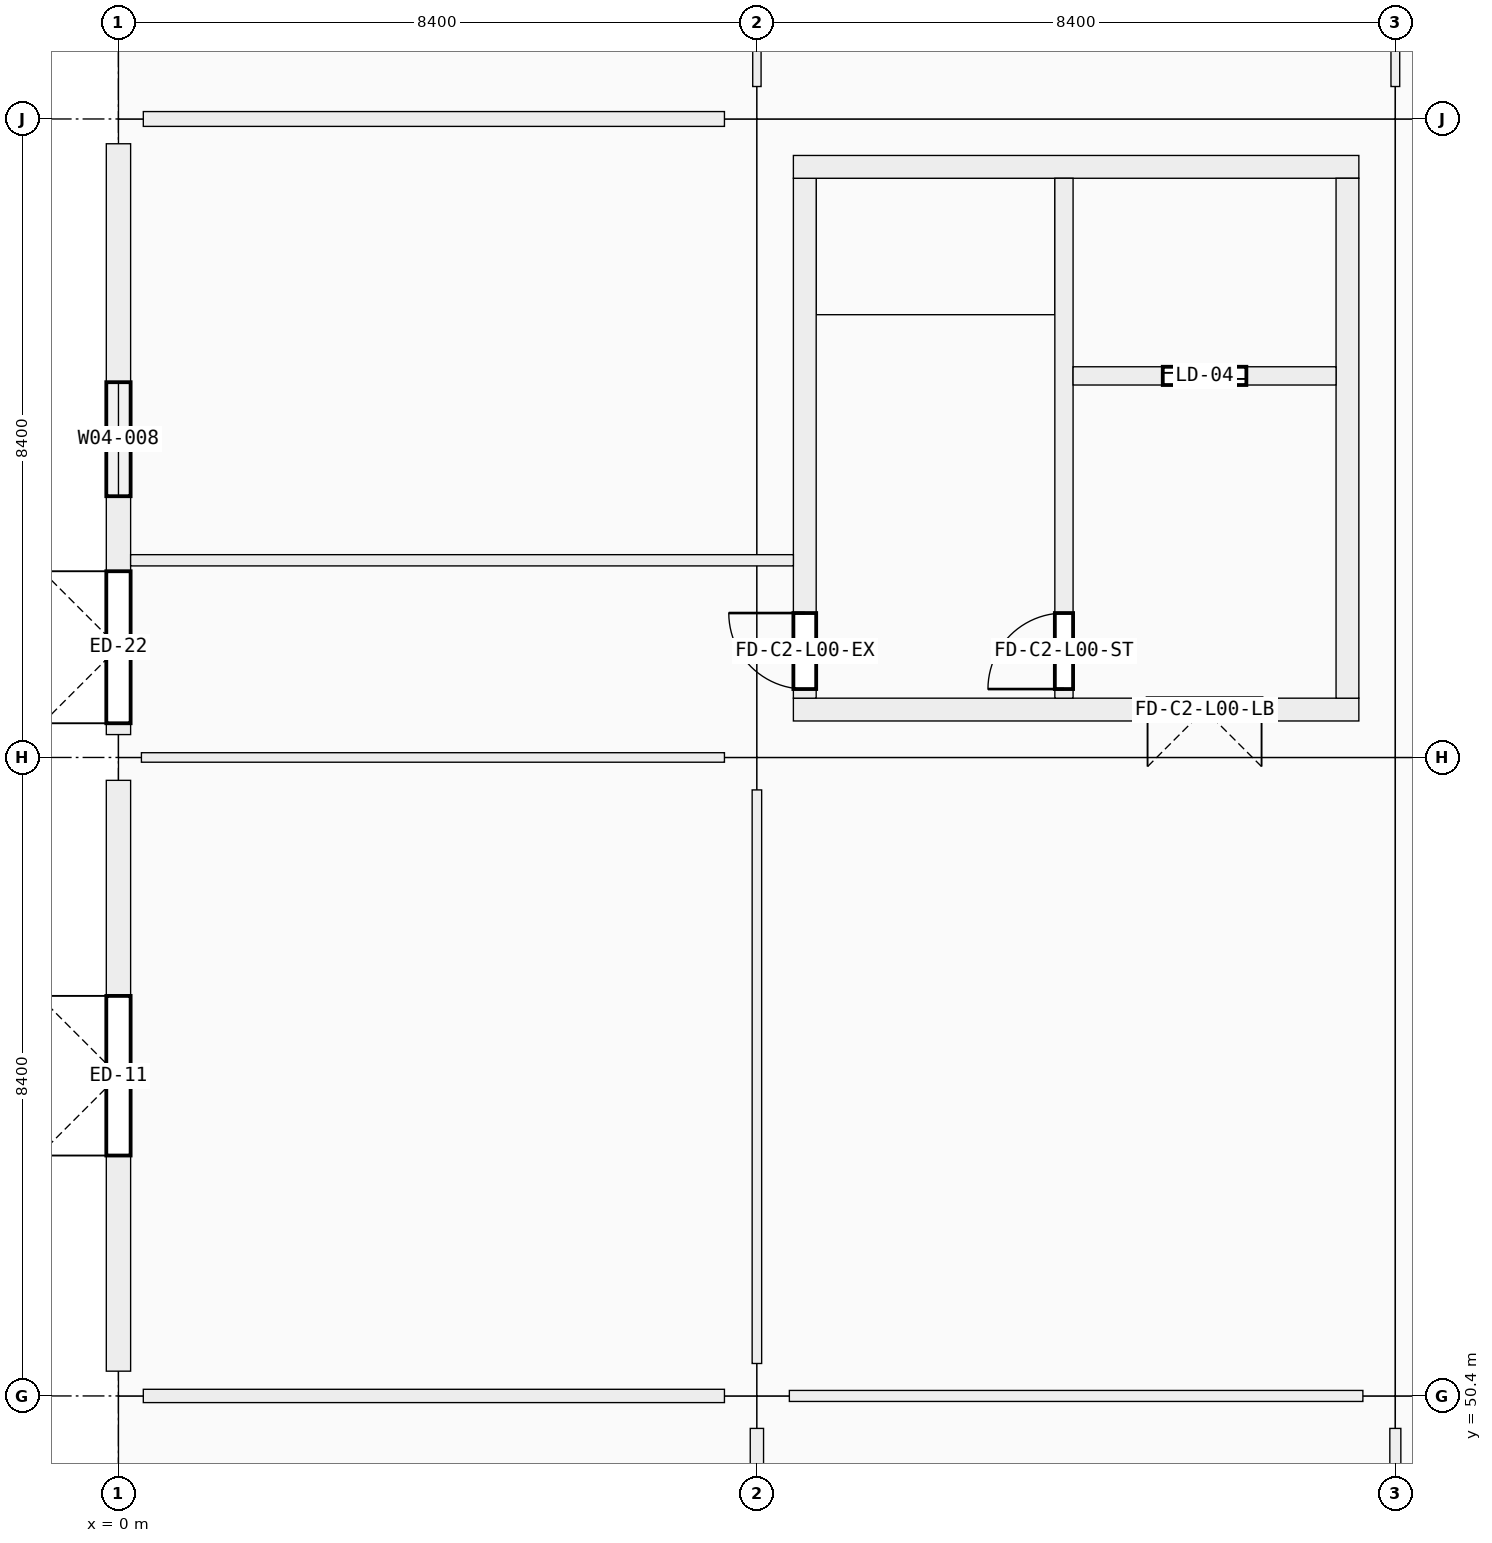
"""IFC4 building model, lengths in metres.
Left out: names, types, materials, properties, quantities, classifications, styles, units other than length and angle.
Written with IfcOpenShell. Run it as: python <this file> out.ifc"""

import sys

from ifc_helpers import new_model, si_unit, direction, frame, frame_2d, origin, origin_2d, place, context, subcontext, project, spatial, rectangle, extrude, element, fill, save


model = new_model("IFC4")
c1 = context("Model", 3, precision=1e-05, world=origin(), true_north=direction((0.0, 1.0)))
c2 = subcontext(c1, "Body", "Model", "MODEL_VIEW")
j1 = project(units=[si_unit("LENGTHUNIT", "METRE"), si_unit("PLANEANGLEUNIT", "RADIAN")], contexts=[c1])
p1 = place(None, origin())
s1 = spatial("IfcSite", under=j1, at=p1, CompositionType="ELEMENT")
p2 = place(p1, origin())
s2 = spatial("IfcBuilding", under=s1, at=p2, CompositionType="ELEMENT")
p3 = place(p2, origin())
s3 = spatial("IfcBuildingStorey", under=s2, at=p3, CompositionType="ELEMENT", Elevation=0.0)
p4 = place(p3, frame((0.0, 50.4, 0.0), z_axis=(0.0, 0.0, 1.0), x_axis=(1.0, 0.0, 0.0)))
e1 = element("IfcColumn", 1, at=p4, inside=s3, PredefinedType="COLUMN", context=c2, shape_type="SweptSolid", body=[
    extrude(rectangle(XDim=0.65, YDim=0.65, at=origin_2d()), origin(), (0.0, 0.0, 1.0), 5.76),
])
p5 = place(p3, frame((0.0, 58.8, 0.0), z_axis=(0.0, 0.0, 1.0), x_axis=(1.0, 0.0, 0.0)))
e2 = element("IfcColumn", 2, at=p5, inside=s3, PredefinedType="COLUMN", context=c2, shape_type="SweptSolid", body=[
    extrude(rectangle(XDim=0.6, YDim=0.6, at=origin_2d()), origin(), (0.0, 0.0, 1.0), 5.76),
])
p6 = place(p3, frame((0.0, 67.2, 0.0), z_axis=(0.0, 0.0, 1.0), x_axis=(1.0, 0.0, 0.0)))
e3 = element("IfcColumn", 3, at=p6, inside=s3, PredefinedType="COLUMN", context=c2, shape_type="SweptSolid", body=[
    extrude(rectangle(XDim=0.65, YDim=0.65, at=origin_2d()), origin(), (0.0, 0.0, 1.0), 5.76),
])
for number, where, z_axis, x_axis in (
    (4, (8.4, 50.4, 0.0), (0.0, 0.0, 1.0), (1.0, 0.0, 0.0)),
    (5, (8.4, 58.8, 0.0), (0.0, 0.0, 1.0), (1.0, 0.0, 0.0)),
    (6, (8.4, 67.2, 0.0), (0.0, 0.0, 1.0), (1.0, 0.0, 0.0)),
    (7, (16.8, 50.4, 0.0), (0.0, 0.0, 1.0), (1.0, 0.0, 0.0)),
    (8, (16.8, 58.8, 0.0), (0.0, 0.0, 1.0), (1.0, 0.0, 0.0)),
    (9, (16.8, 67.2, 0.0), (0.0, 0.0, 1.0), (1.0, 0.0, 0.0)),
):
    element("IfcColumn", number, at=place(p3, frame(where, z_axis=z_axis, x_axis=x_axis)), inside=s3, PredefinedType="COLUMN", context=c2, shape_type="SweptSolid", body=[
        extrude(rectangle(XDim=0.85, YDim=0.85, at=origin_2d()), origin(), (0.0, 0.0, 1.0), 5.76),
    ])
p7 = place(p3, frame((0.0, 50.726, 0.0), z_axis=(0.0, 0.0, 1.0), x_axis=(0.0, 1.0, 0.0)))
e10 = element("IfcWall", 10, at=p7, inside=s3, PredefinedType="SOLIDWALL", context=c2, shape_type="SweptSolid", body=[
    extrude(rectangle(XDim=7.773, YDim=0.32, at=frame_2d((3.886, 0.0))), origin(), (0.0, 0.0, 1.0), 4.7),
])
p8 = place(p7, frame((2.837, 0.0, 0.0)))
e11 = element("IfcOpeningElement", 11, at=p8, cuts=e10, PredefinedType="OPENING", context=c2, shape_type="SweptSolid", body=[
    extrude(rectangle(XDim=2.1, YDim=2.25, at=frame_2d((1.05, 1.125))), frame((0.0, 0.16, 0.0), z_axis=(0.0, -1.0, 0.0), x_axis=(1.0, 0.0, 0.0)), (0.0, 0.0, 1.0), 0.32),
])
p9 = place(p3, frame((0.0, 59.101, 0.0), z_axis=(0.0, 0.0, 1.0), x_axis=(0.0, 1.0, 0.0)))
e12 = element("IfcWall", 12, at=p9, inside=s3, PredefinedType="SOLIDWALL", context=c2, shape_type="SweptSolid", body=[
    extrude(rectangle(XDim=7.773, YDim=0.32, at=frame_2d((3.886, 0.0))), origin(), (0.0, 0.0, 1.0), 4.7),
])
p10 = place(p9, frame((3.136, 0.0, 0.9)))
e13 = element("IfcOpeningElement", 13, at=p10, cuts=e12, PredefinedType="OPENING", context=c2, shape_type="SweptSolid", body=[
    extrude(rectangle(XDim=1.5, YDim=1.8, at=frame_2d((0.75, 0.9))), frame((0.0, 0.16, 0.0), z_axis=(0.0, -1.0, 0.0), x_axis=(1.0, 0.0, 0.0)), (0.0, 0.0, 1.0), 0.32),
])
p11 = place(p9, frame((0.149, 0.0, 0.0)))
e14 = element("IfcOpeningElement", 14, at=p11, cuts=e12, PredefinedType="OPENING", context=c2, shape_type="SweptSolid", body=[
    extrude(rectangle(XDim=2.0, YDim=2.25, at=frame_2d((1.0, 1.125))), frame((0.0, 0.16, 0.0), z_axis=(0.0, -1.0, 0.0), x_axis=(1.0, 0.0, 0.0)), (0.0, 0.0, 1.0), 0.32),
])
p12 = place(p3, frame((16.32, 59.43, 0.0), z_axis=(0.0, 0.0, 1.0), x_axis=(-1.0, 0.0, 0.0)))
e15 = element("IfcWall", 15, at=p12, inside=s3, PredefinedType="SHEAR", context=c2, shape_type="SweptSolid", body=[
    extrude(rectangle(XDim=7.44, YDim=0.3, at=frame_2d((3.72, 0.0))), origin(), (0.0, 0.0, 1.0), 5.76),
])
p13 = place(p12, frame((1.28, 0.0, 0.0)))
e16 = element("IfcOpeningElement", 16, at=p13, cuts=e15, PredefinedType="OPENING", context=c2, shape_type="SweptSolid", body=[
    extrude(rectangle(XDim=1.5, YDim=2.15, at=frame_2d((0.75, 1.075))), frame((0.0, 0.15, 0.0), z_axis=(0.0, -1.0, 0.0), x_axis=(1.0, 0.0, 0.0)), (0.0, 0.0, 1.0), 0.3),
])
p14 = place(p3, frame((9.03, 59.58, 0.0), z_axis=(0.0, 0.0, 1.0), x_axis=(0.0, 1.0, 0.0)))
e17 = element("IfcWall", 17, at=p14, inside=s3, PredefinedType="SHEAR", context=c2, shape_type="SweptSolid", body=[
    extrude(rectangle(XDim=6.84, YDim=0.3, at=frame_2d((3.42, 0.0))), origin(), (0.0, 0.0, 1.0), 5.76),
])
p15 = place(p14, frame((0.12, 0.0, 0.0)))
e18 = element("IfcOpeningElement", 18, at=p15, cuts=e17, PredefinedType="OPENING", context=c2, shape_type="SweptSolid", body=[
    extrude(rectangle(XDim=1.0, YDim=2.15, at=frame_2d((0.5, 1.075))), frame((0.0, 0.15, 0.0), z_axis=(0.0, -1.0, 0.0), x_axis=(1.0, 0.0, 0.0)), (0.0, 0.0, 1.0), 0.3),
])
p16 = place(p3, frame((8.88, 66.57, 0.0), z_axis=(0.0, 0.0, 1.0), x_axis=(1.0, 0.0, 0.0)))
e19 = element("IfcWall", 19, at=p16, inside=s3, PredefinedType="SHEAR", context=c2, shape_type="SweptSolid", body=[
    extrude(rectangle(XDim=7.44, YDim=0.3, at=frame_2d((3.72, 0.0))), origin(), (0.0, 0.0, 1.0), 5.76),
])
p17 = place(p3, frame((16.17, 66.42, 0.0), z_axis=(0.0, 0.0, 1.0), x_axis=(0.0, -1.0, 0.0)))
e20 = element("IfcWall", 20, at=p17, inside=s3, PredefinedType="SHEAR", context=c2, shape_type="SweptSolid", body=[
    extrude(rectangle(XDim=6.84, YDim=0.3, at=frame_2d((3.42, 0.0))), origin(), (0.0, 0.0, 1.0), 5.76),
])
p18 = place(p3, frame((12.44, 59.58, 0.0), z_axis=(0.0, 0.0, 1.0), x_axis=(0.0, 1.0, 0.0)))
e21 = element("IfcWall", 21, at=p18, inside=s3, PredefinedType="SHEAR", context=c2, shape_type="SweptSolid", body=[
    extrude(rectangle(XDim=6.84, YDim=0.24, at=frame_2d((3.42, 0.0))), origin(), (0.0, 0.0, 1.0), 5.76),
])
p19 = place(p18, frame((0.12, 0.0, 0.0)))
e22 = element("IfcOpeningElement", 22, at=p19, cuts=e21, PredefinedType="OPENING", context=c2, shape_type="SweptSolid", body=[
    extrude(rectangle(XDim=1.0, YDim=2.15, at=frame_2d((0.5, 1.075))), frame((0.0, 0.12, 0.0), z_axis=(0.0, -1.0, 0.0), x_axis=(1.0, 0.0, 0.0)), (0.0, 0.0, 1.0), 0.24),
])
p20 = place(p3, frame((12.56, 63.82, 0.0), z_axis=(0.0, 0.0, 1.0), x_axis=(1.0, 0.0, 0.0)))
e23 = element("IfcWall", 23, at=p20, inside=s3, PredefinedType="SHEAR", context=c2, shape_type="SweptSolid", body=[
    extrude(rectangle(XDim=3.46, YDim=0.24, at=frame_2d((1.73, 0.0))), origin(), (0.0, 0.0, 1.0), 5.76),
])
p21 = place(p20, frame((1.18, 0.0, 0.0)))
e24 = element("IfcOpeningElement", 24, at=p21, cuts=e23, PredefinedType="OPENING", context=c2, shape_type="SweptSolid", body=[
    extrude(rectangle(XDim=1.1, YDim=2.15, at=frame_2d((0.55, 1.075))), frame((0.0, 0.12, 0.0), z_axis=(0.0, -1.0, 0.0), x_axis=(1.0, 0.0, 0.0)), (0.0, 0.0, 1.0), 0.24),
])
p22 = place(p3, frame((0.327, 50.4, 0.0), z_axis=(0.0, 0.0, 1.0), x_axis=(1.0, 0.0, 0.0)))
e25 = element("IfcWall", 25, at=p22, inside=s3, PredefinedType="PARTITIONING", context=c2, shape_type="SweptSolid", body=[
    extrude(rectangle(XDim=7.646, YDim=0.175, at=frame_2d((3.823, 0.0))), origin(), (0.0, 0.0, 1.0), 3.66),
])
p23 = place(p22, frame((3.318, 0.0, 0.0)))
e26 = element("IfcOpeningElement", 26, at=p23, cuts=e25, PredefinedType="OPENING", context=c2, shape_type="SweptSolid", body=[
    extrude(rectangle(XDim=1.01, YDim=2.12, at=frame_2d((0.505, 1.06))), frame((0.0, 0.087, 0.0), z_axis=(0.0, -1.0, 0.0), x_axis=(1.0, 0.0, 0.0)), (0.0, 0.0, 1.0), 0.175),
])
p24 = place(p3, frame((0.302, 58.8, 0.0), z_axis=(0.0, 0.0, 1.0), x_axis=(1.0, 0.0, 0.0)))
e27 = element("IfcWall", 27, at=p24, inside=s3, PredefinedType="PARTITIONING", context=c2, shape_type="SweptSolid", body=[
    extrude(rectangle(XDim=7.671, YDim=0.125, at=frame_2d((3.835, 0.0))), origin(), (0.0, 0.0, 1.0), 3.66),
])
p25 = place(p24, frame((3.316, 0.0, 0.0)))
e28 = element("IfcOpeningElement", 28, at=p25, cuts=e27, PredefinedType="OPENING", context=c2, shape_type="SweptSolid", body=[
    extrude(rectangle(XDim=1.04, YDim=2.2, at=frame_2d((0.52, 1.1))), frame((0.0, 0.062, 0.0), z_axis=(0.0, -1.0, 0.0), x_axis=(1.0, 0.0, 0.0)), (0.0, 0.0, 1.0), 0.125),
])
p26 = place(p3, frame((0.327, 67.2, 0.0), z_axis=(0.0, 0.0, 1.0), x_axis=(1.0, 0.0, 0.0)))
e29 = element("IfcWall", 29, at=p26, inside=s3, PredefinedType="PARTITIONING", context=c2, shape_type="SweptSolid", body=[
    extrude(rectangle(XDim=7.646, YDim=0.195, at=frame_2d((3.823, 0.0))), origin(), (0.0, 0.0, 1.0), 3.66),
])
p27 = place(p26, frame((3.313, 0.0, 0.0)))
e30 = element("IfcOpeningElement", 30, at=p27, cuts=e29, PredefinedType="OPENING", context=c2, shape_type="SweptSolid", body=[
    extrude(rectangle(XDim=1.02, YDim=2.2, at=frame_2d((0.51, 1.1))), frame((0.0, 0.098, 0.0), z_axis=(0.0, -1.0, 0.0), x_axis=(1.0, 0.0, 0.0)), (0.0, 0.0, 1.0), 0.195),
])
p28 = place(p3, frame((8.827, 50.4, 0.0), z_axis=(0.0, 0.0, 1.0), x_axis=(1.0, 0.0, 0.0)))
e31 = element("IfcWall", 31, at=p28, inside=s3, PredefinedType="PARTITIONING", context=c2, shape_type="SweptSolid", body=[
    extrude(rectangle(XDim=7.546, YDim=0.145, at=frame_2d((3.773, 0.0))), origin(), (0.0, 0.0, 1.0), 3.66),
])
p29 = place(p28, frame((3.263, 0.0, 0.0)))
e32 = element("IfcOpeningElement", 32, at=p29, cuts=e31, PredefinedType="OPENING", context=c2, shape_type="SweptSolid", body=[
    extrude(rectangle(XDim=1.02, YDim=2.2, at=frame_2d((0.51, 1.1))), frame((0.0, 0.073, 0.0), z_axis=(0.0, -1.0, 0.0), x_axis=(1.0, 0.0, 0.0)), (0.0, 0.0, 1.0), 0.145),
])
p30 = place(p3, frame((8.4, 42.427, 0.0), z_axis=(0.0, 0.0, 1.0), x_axis=(0.0, 1.0, 0.0)))
e33 = element("IfcWall", 33, at=p30, inside=s3, PredefinedType="PARTITIONING", context=c2, shape_type="SweptSolid", body=[
    extrude(rectangle(XDim=7.546, YDim=0.175, at=frame_2d((3.773, 0.0))), origin(), (0.0, 0.0, 1.0), 3.66),
])
p31 = place(p30, frame((3.303, 0.0, 0.0)))
e34 = element("IfcOpeningElement", 34, at=p31, cuts=e33, PredefinedType="OPENING", context=c2, shape_type="SweptSolid", body=[
    extrude(rectangle(XDim=0.94, YDim=2.15, at=frame_2d((0.47, 1.075))), frame((0.0, 0.087, 0.0), z_axis=(0.0, -1.0, 0.0), x_axis=(1.0, 0.0, 0.0)), (0.0, 0.0, 1.0), 0.175),
])
p32 = place(p3, frame((8.4, 50.827, 0.0), z_axis=(0.0, 0.0, 1.0), x_axis=(0.0, 1.0, 0.0)))
e35 = element("IfcWall", 35, at=p32, inside=s3, PredefinedType="PARTITIONING", context=c2, shape_type="SweptSolid", body=[
    extrude(rectangle(XDim=7.546, YDim=0.125, at=frame_2d((3.773, 0.0))), origin(), (0.0, 0.0, 1.0), 3.66),
])
p33 = place(p32, frame((3.263, 0.0, 0.0)))
e36 = element("IfcOpeningElement", 36, at=p33, cuts=e35, PredefinedType="OPENING", context=c2, shape_type="SweptSolid", body=[
    extrude(rectangle(XDim=1.02, YDim=2.2, at=frame_2d((0.51, 1.1))), frame((0.0, 0.062, 0.0), z_axis=(0.0, -1.0, 0.0), x_axis=(1.0, 0.0, 0.0)), (0.0, 0.0, 1.0), 0.125),
])
p34 = place(p3, frame((8.4, 67.627, 0.0), z_axis=(0.0, 0.0, 1.0), x_axis=(0.0, 1.0, 0.0)))
e37 = element("IfcWall", 37, at=p34, inside=s3, PredefinedType="MOVABLE", context=c2, shape_type="SweptSolid", body=[
    extrude(rectangle(XDim=7.546, YDim=0.11, at=frame_2d((3.773, 0.0))), origin(), (0.0, 0.0, 1.0), 3.66),
])
p35 = place(p34, frame((3.273, 0.0, 0.0)))
e38 = element("IfcOpeningElement", 38, at=p35, cuts=e37, PredefinedType="OPENING", context=c2, shape_type="SweptSolid", body=[
    extrude(rectangle(XDim=1.0, YDim=2.2, at=frame_2d((0.5, 1.1))), frame((0.0, 0.055, 0.0), z_axis=(0.0, -1.0, 0.0), x_axis=(1.0, 0.0, 0.0)), (0.0, 0.0, 1.0), 0.11),
])
p36 = place(p3, frame((16.8, 42.427, 0.0), z_axis=(0.0, 0.0, 1.0), x_axis=(0.0, 1.0, 0.0)))
e39 = element("IfcWall", 39, at=p36, inside=s3, PredefinedType="PARTITIONING", context=c2, shape_type="SweptSolid", body=[
    extrude(rectangle(XDim=7.546, YDim=0.145, at=frame_2d((3.773, 0.0))), origin(), (0.0, 0.0, 1.0), 3.66),
])
p37 = place(p3, frame((16.8, 67.627, 0.0), z_axis=(0.0, 0.0, 1.0), x_axis=(0.0, 1.0, 0.0)))
e40 = element("IfcWall", 40, at=p37, inside=s3, PredefinedType="PARTITIONING", context=c2, shape_type="SweptSolid", body=[
    extrude(rectangle(XDim=7.546, YDim=0.115, at=frame_2d((3.773, 0.0))), origin(), (0.0, 0.0, 1.0), 3.66),
])
p38 = place(p37, frame((3.248, 0.0, 0.0)))
e41 = element("IfcOpeningElement", 41, at=p38, cuts=e40, PredefinedType="OPENING", context=c2, shape_type="SweptSolid", body=[
    extrude(rectangle(XDim=1.05, YDim=2.12, at=frame_2d((0.525, 1.06))), frame((0.0, 0.058, 0.0), z_axis=(0.0, -1.0, 0.0), x_axis=(1.0, 0.0, 0.0)), (0.0, 0.0, 1.0), 0.115),
])
p39 = place(p3, frame((0.16, 61.394, 0.0), z_axis=(0.0, 0.0, 1.0), x_axis=(1.0, 0.0, 0.0)))
e42 = element("IfcWall", 42, at=p39, inside=s3, PredefinedType="PARTITIONING", context=c2, shape_type="SweptSolid", body=[
    extrude(rectangle(XDim=8.72, YDim=0.148, at=frame_2d((4.36, 0.0))), origin(), (0.0, 0.0, 1.0), 3.66),
])
p40 = place(p8, origin())
e43 = element("IfcDoor", 43, at=p40, inside=s3, OperationType="DOUBLE_DOOR_SINGLE_SWING", PredefinedType="DOOR", context=c2, shape_type="SweptSolid", body=[
    extrude(rectangle(XDim=2.1, YDim=2.25, at=frame_2d((1.05, 1.125))), frame((0.0, 0.025, 0.0), z_axis=(0.0, -1.0, 0.0), x_axis=(1.0, 0.0, 0.0)), (0.0, 0.0, 1.0), 0.05),
])
fill(e11, e43)
p41 = place(p10, origin())
e44 = element("IfcWindow", 44, at=p41, inside=s3, PartitioningType="SINGLE_PANEL", PredefinedType="WINDOW", context=c2, shape_type="SweptSolid", body=[
    extrude(rectangle(XDim=1.5, YDim=1.8, at=frame_2d((0.75, 0.9))), frame((0.0, 0.03, 0.0), z_axis=(0.0, -1.0, 0.0), x_axis=(1.0, 0.0, 0.0)), (0.0, 0.0, 1.0), 0.06),
])
fill(e13, e44)
p42 = place(p11, origin())
e45 = element("IfcDoor", 45, at=p42, inside=s3, OperationType="DOUBLE_DOOR_SINGLE_SWING", PredefinedType="DOOR", context=c2, shape_type="SweptSolid", body=[
    extrude(rectangle(XDim=2.0, YDim=2.25, at=frame_2d((1.0, 1.125))), frame((0.0, 0.025, 0.0), z_axis=(0.0, -1.0, 0.0), x_axis=(1.0, 0.0, 0.0)), (0.0, 0.0, 1.0), 0.05),
])
fill(e14, e45)
p43 = place(p19, origin())
e46 = element("IfcDoor", 46, at=p43, inside=s3, OperationType="SINGLE_SWING_LEFT", PredefinedType="DOOR", context=c2, shape_type="SweptSolid", body=[
    extrude(rectangle(XDim=1.0, YDim=2.15, at=frame_2d((0.5, 1.075))), frame((0.0, 0.025, 0.0), z_axis=(0.0, -1.0, 0.0), x_axis=(1.0, 0.0, 0.0)), (0.0, 0.0, 1.0), 0.05),
])
fill(e22, e46)
p44 = place(p13, origin())
e47 = element("IfcDoor", 47, at=p44, inside=s3, OperationType="DOUBLE_DOOR_SINGLE_SWING", PredefinedType="DOOR", context=c2, shape_type="SweptSolid", body=[
    extrude(rectangle(XDim=1.5, YDim=2.15, at=frame_2d((0.75, 1.075))), frame((0.0, 0.025, 0.0), z_axis=(0.0, -1.0, 0.0), x_axis=(1.0, 0.0, 0.0)), (0.0, 0.0, 1.0), 0.05),
])
fill(e16, e47)
p45 = place(p15, origin())
e48 = element("IfcDoor", 48, at=p45, inside=s3, OperationType="SINGLE_SWING_RIGHT", PredefinedType="DOOR", context=c2, shape_type="SweptSolid", body=[
    extrude(rectangle(XDim=1.0, YDim=2.15, at=frame_2d((0.5, 1.075))), frame((0.0, 0.025, 0.0), z_axis=(0.0, -1.0, 0.0), x_axis=(1.0, 0.0, 0.0)), (0.0, 0.0, 1.0), 0.05),
])
fill(e18, e48)
p46 = place(p21, origin())
e49 = element("IfcDoor", 49, at=p46, inside=s3, OperationType="DOUBLE_DOOR_SLIDING", PredefinedType="DOOR", context=c2, shape_type="SweptSolid", body=[
    extrude(rectangle(XDim=1.1, YDim=2.15, at=frame_2d((0.55, 1.075))), frame((0.0, 0.025, 0.0), z_axis=(0.0, -1.0, 0.0), x_axis=(1.0, 0.0, 0.0)), (0.0, 0.0, 1.0), 0.05),
])
fill(e24, e49)
p47 = place(p29, origin())
e50 = element("IfcDoor", 50, at=p47, inside=s3, OperationType="SINGLE_SWING_RIGHT", PredefinedType="DOOR", context=c2, shape_type="SweptSolid", body=[
    extrude(rectangle(XDim=1.02, YDim=2.2, at=frame_2d((0.51, 1.1))), frame((0.0, 0.025, 0.0), z_axis=(0.0, -1.0, 0.0), x_axis=(1.0, 0.0, 0.0)), (0.0, 0.0, 1.0), 0.05),
])
fill(e32, e50)
p48 = place(p33, origin())
e51 = element("IfcDoor", 51, at=p48, inside=s3, OperationType="SINGLE_SWING_LEFT", PredefinedType="DOOR", context=c2, shape_type="SweptSolid", body=[
    extrude(rectangle(XDim=1.02, YDim=2.2, at=frame_2d((0.51, 1.1))), frame((0.0, 0.025, 0.0), z_axis=(0.0, -1.0, 0.0), x_axis=(1.0, 0.0, 0.0)), (0.0, 0.0, 1.0), 0.05),
])
fill(e36, e51)
p49 = place(p25, origin())
e52 = element("IfcDoor", 52, at=p49, inside=s3, OperationType="SINGLE_SWING_RIGHT", PredefinedType="DOOR", context=c2, shape_type="SweptSolid", body=[
    extrude(rectangle(XDim=1.04, YDim=2.2, at=frame_2d((0.52, 1.1))), frame((0.0, 0.025, 0.0), z_axis=(0.0, -1.0, 0.0), x_axis=(1.0, 0.0, 0.0)), (0.0, 0.0, 1.0), 0.05),
])
fill(e28, e52)
p50 = place(p27, origin())
e53 = element("IfcDoor", 53, at=p50, inside=s3, OperationType="SINGLE_SWING_LEFT", PredefinedType="DOOR", context=c2, shape_type="SweptSolid", body=[
    extrude(rectangle(XDim=1.02, YDim=2.2, at=frame_2d((0.51, 1.1))), frame((0.0, 0.025, 0.0), z_axis=(0.0, -1.0, 0.0), x_axis=(1.0, 0.0, 0.0)), (0.0, 0.0, 1.0), 0.05),
])
fill(e30, e53)
p51 = place(p23, origin())
e54 = element("IfcDoor", 54, at=p51, inside=s3, OperationType="SINGLE_SWING_RIGHT", PredefinedType="DOOR", context=c2, shape_type="SweptSolid", body=[
    extrude(rectangle(XDim=1.01, YDim=2.12, at=frame_2d((0.505, 1.06))), frame((0.0, 0.025, 0.0), z_axis=(0.0, -1.0, 0.0), x_axis=(1.0, 0.0, 0.0)), (0.0, 0.0, 1.0), 0.05),
])
fill(e26, e54)
save(model, sys.argv[1])
